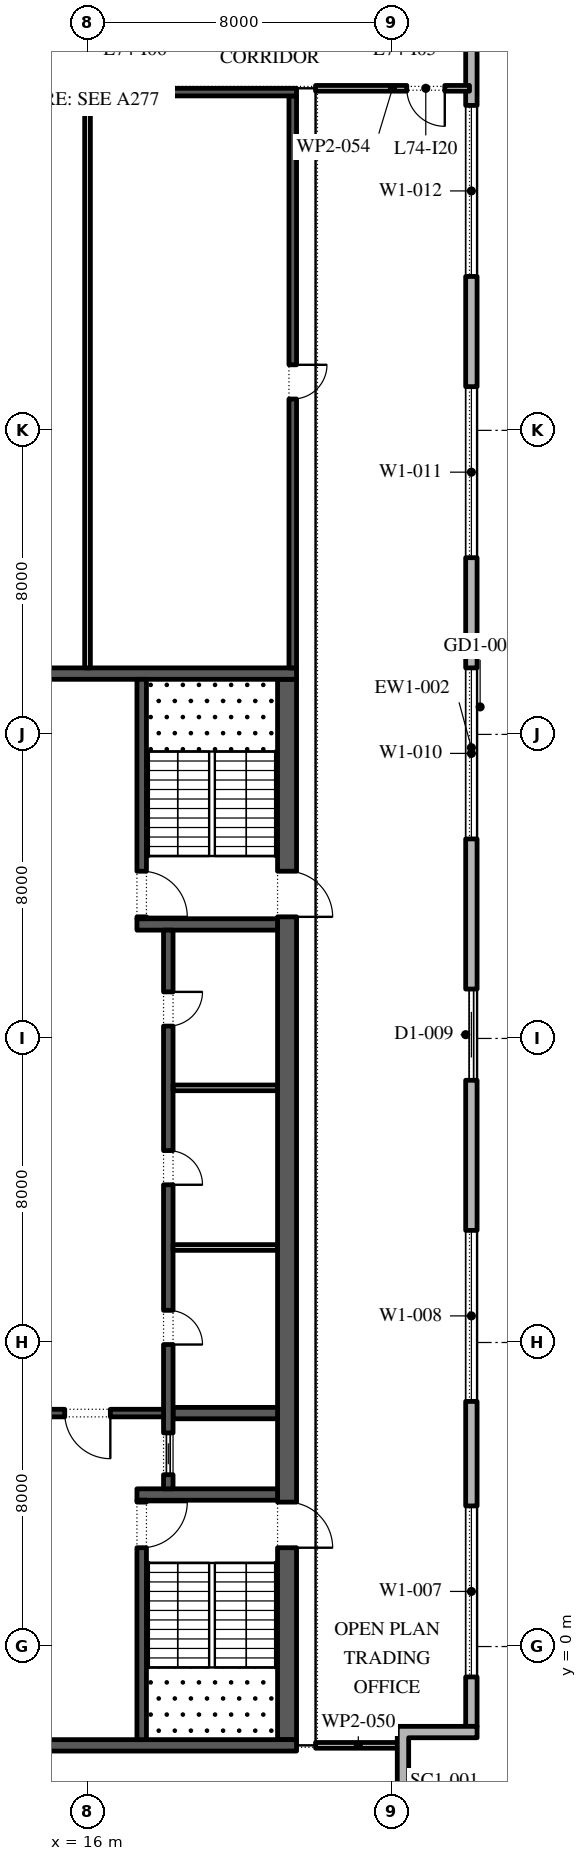
"""IFC4 building model, lengths in metres.
Left out: names, types, materials, properties, quantities, classifications, styles, units other than length and angle.
Written with IfcOpenShell. Run it as: python <this file> out.ifc"""

import sys

from ifc_helpers import new_model, si_unit, direction, frame, frame_2d, origin, place, context, subcontext, project, spatial, polyline, rectangle, outline, extrude, element, fill, save


model = new_model("IFC4")
c1 = context("Model", 3, precision=1e-05, world=origin(), true_north=direction((0.0, 1.0)))
c2 = subcontext(c1, "Body", "Model", "MODEL_VIEW")
j1 = project(units=[si_unit("LENGTHUNIT", "METRE"), si_unit("PLANEANGLEUNIT", "RADIAN")], contexts=[c1])
p1 = place(None, origin())
s1 = spatial("IfcSite", under=j1, at=p1, CompositionType="ELEMENT")
p2 = place(p1, origin())
s2 = spatial("IfcBuilding", under=s1, at=p2, CompositionType="ELEMENT")
p3 = place(p2, frame((0.0, 0.0, 338.4)))
s3 = spatial("IfcBuildingStorey", under=s2, at=p3, CompositionType="ELEMENT", Elevation=338.4)
p4 = place(p3, frame((26.1, -2.1, 0.0), z_axis=(0.0, 0.0, 1.0), x_axis=(0.0, 1.0, 0.0)))
e1 = element("IfcWall", 1, at=p4, inside=s3, PredefinedType="STANDARD", context=c2, shape_type="SweptSolid", body=[
    extrude(rectangle(XDim=51.5, YDim=0.3, at=frame_2d((25.75, 0.0))), origin(), (0.0, 0.0, 1.0), 4.0),
])
p5 = place(p4, frame((1.3, 0.0, 0.45)))
e2 = element("IfcOpeningElement", 2, at=p5, cuts=e1, PredefinedType="OPENING", context=c2, shape_type="SweptSolid", body=[
    extrude(rectangle(XDim=4.5, YDim=3.05, at=frame_2d((2.25, 1.525))), frame((0.0, 0.16, 0.0), z_axis=(0.0, -1.0, 0.0), x_axis=(1.0, 0.0, 0.0)), (0.0, 0.0, 1.0), 0.32),
])
p6 = place(p4, frame((8.55, 0.0, 0.45)))
e3 = element("IfcOpeningElement", 3, at=p6, cuts=e1, PredefinedType="OPENING", context=c2, shape_type="SweptSolid", body=[
    extrude(rectangle(XDim=4.5, YDim=3.05, at=frame_2d((2.25, 1.525))), frame((0.0, 0.16, 0.0), z_axis=(0.0, -1.0, 0.0), x_axis=(1.0, 0.0, 0.0)), (0.0, 0.0, 1.0), 0.32),
])
p7 = place(p4, frame((17.0, 0.0, 0.0)))
e4 = element("IfcOpeningElement", 4, at=p7, cuts=e1, PredefinedType="OPENING", context=c2, shape_type="SweptSolid", body=[
    extrude(rectangle(XDim=2.4, YDim=3.5, at=frame_2d((1.2, 1.75))), frame((0.0, 0.16, 0.0), z_axis=(0.0, -1.0, 0.0), x_axis=(1.0, 0.0, 0.0)), (0.0, 0.0, 1.0), 0.32),
])
p8 = place(p4, frame((23.35, 0.0, 0.45)))
e5 = element("IfcOpeningElement", 5, at=p8, cuts=e1, PredefinedType="OPENING", context=c2, shape_type="SweptSolid", body=[
    extrude(rectangle(XDim=4.5, YDim=3.05, at=frame_2d((2.25, 1.525))), frame((0.0, 0.16, 0.0), z_axis=(0.0, -1.0, 0.0), x_axis=(1.0, 0.0, 0.0)), (0.0, 0.0, 1.0), 0.32),
])
p9 = place(p4, frame((30.75, 0.0, 0.45)))
e6 = element("IfcOpeningElement", 6, at=p9, cuts=e1, PredefinedType="OPENING", context=c2, shape_type="SweptSolid", body=[
    extrude(rectangle(XDim=4.5, YDim=3.05, at=frame_2d((2.25, 1.525))), frame((0.0, 0.16, 0.0), z_axis=(0.0, -1.0, 0.0), x_axis=(1.0, 0.0, 0.0)), (0.0, 0.0, 1.0), 0.32),
])
p10 = place(p4, frame((38.15, 0.0, 0.45)))
e7 = element("IfcOpeningElement", 7, at=p10, cuts=e1, PredefinedType="OPENING", context=c2, shape_type="SweptSolid", body=[
    extrude(rectangle(XDim=4.5, YDim=3.05, at=frame_2d((2.25, 1.525))), frame((0.0, 0.16, 0.0), z_axis=(0.0, -1.0, 0.0), x_axis=(1.0, 0.0, 0.0)), (0.0, 0.0, 1.0), 0.32),
])
p11 = place(p4, frame((46.6, 0.0, 0.0)))
e8 = element("IfcOpeningElement", 8, at=p11, cuts=e1, PredefinedType="OPENING", context=c2, shape_type="SweptSolid", body=[
    extrude(rectangle(XDim=2.4, YDim=3.5, at=frame_2d((1.2, 1.75))), frame((0.0, 0.16, 0.0), z_axis=(0.0, -1.0, 0.0), x_axis=(1.0, 0.0, 0.0)), (0.0, 0.0, 1.0), 0.32),
])
p12 = place(p3, origin())
e9 = element("IfcWall", 9, at=p12, inside=s3, PredefinedType="STANDARD", context=c2, shape_type="SweptSolid", body=[
    extrude(outline(polyline([(24.15, -3.9), (24.15, -2.1), (26.25, -2.1), (26.25, -2.4), (24.45, -2.4), (24.45, -4.2), (22.65, -4.2), (22.65, -5.7), (22.35, -5.7), (22.35, -3.9), (24.15, -3.9)])), origin(), (0.0, 0.0, 1.0), 4.0),
])
p13 = place(p3, frame((21.25, -2.45, 0.0), z_axis=(0.0, 0.0, 1.0), x_axis=(0.0, 1.0, 0.0)))
e10 = element("IfcWall", 10, at=p13, inside=s3, PredefinedType="SHEAR", context=c2, shape_type="SweptSolid", body=[
    extrude(rectangle(XDim=27.9, YDim=0.5, at=frame_2d((13.95, 0.0))), origin(), (0.0, 0.0, 1.0), 4.0),
])
p14 = place(p13, frame((5.05, 0.0, 0.0)))
e11 = element("IfcOpeningElement", 11, at=p14, cuts=e10, PredefinedType="OPENING", context=c2, shape_type="SweptSolid", body=[
    extrude(rectangle(XDim=1.2, YDim=2.1, at=frame_2d((0.6, 1.05))), frame((0.0, 0.26, 0.0), z_axis=(0.0, -1.0, 0.0), x_axis=(1.0, 0.0, 0.0)), (0.0, 0.0, 1.0), 0.52),
])
p15 = place(p13, frame((21.65, 0.0, 0.0)))
e12 = element("IfcOpeningElement", 12, at=p15, cuts=e10, PredefinedType="OPENING", context=c2, shape_type="SweptSolid", body=[
    extrude(rectangle(XDim=1.2, YDim=2.1, at=frame_2d((0.6, 1.05))), frame((0.0, 0.26, 0.0), z_axis=(0.0, -1.0, 0.0), x_axis=(1.0, 0.0, 0.0)), (0.0, 0.0, 1.0), 0.52),
])
for number, where, z_axis, x_axis in (
    (13, (10.5, -2.6, 0.0), (0.0, 0.0, 1.0), (1.0, 0.0, 0.0)),
    (14, (10.5, 25.6, 0.0), (0.0, 0.0, 1.0), (1.0, 0.0, 0.0)),
):
    element("IfcWall", number, at=place(p3, frame(where, z_axis=z_axis, x_axis=x_axis)), inside=s3, PredefinedType="SHEAR", context=c2, shape_type="SweptSolid", body=[
        extrude(rectangle(XDim=11.0, YDim=0.3, at=frame_2d((5.5, 0.0))), origin(), (0.0, 0.0, 1.0), 4.0),
    ])
p16 = place(p3, frame((17.3, 4.0, 0.0), z_axis=(0.0, 0.0, 1.0), x_axis=(1.0, 0.0, 0.0)))
e15 = element("IfcWall", 15, at=p16, inside=s3, PredefinedType="SHEAR", context=c2, shape_type="SweptSolid", body=[
    extrude(rectangle(XDim=3.7, YDim=0.3, at=frame_2d((1.85, 0.0))), origin(), (0.0, 0.0, 1.0), 4.0),
])
p17 = place(p3, frame((17.425, -2.45, 0.0), z_axis=(0.0, 0.0, 1.0), x_axis=(0.0, 1.0, 0.0)))
e16 = element("IfcWall", 16, at=p17, inside=s3, PredefinedType="SHEAR", context=c2, shape_type="SweptSolid", body=[
    extrude(rectangle(XDim=6.3, YDim=0.25, at=frame_2d((3.15, 0.0))), origin(), (0.0, 0.0, 1.0), 4.0),
])
p18 = place(p17, frame((5.05, 0.0, 0.0)))
e17 = element("IfcOpeningElement", 17, at=p18, cuts=e16, PredefinedType="OPENING", context=c2, shape_type="SweptSolid", body=[
    extrude(rectangle(XDim=1.2, YDim=2.1, at=frame_2d((0.6, 1.05))), frame((0.0, 0.135, 0.0), z_axis=(0.0, -1.0, 0.0), x_axis=(1.0, 0.0, 0.0)), (0.0, 0.0, 1.0), 0.27),
])
p19 = place(p3, frame((17.3, 19.0, 0.0), z_axis=(0.0, 0.0, 1.0), x_axis=(1.0, 0.0, 0.0)))
e18 = element("IfcWall", 18, at=p19, inside=s3, PredefinedType="SHEAR", context=c2, shape_type="SweptSolid", body=[
    extrude(rectangle(XDim=3.7, YDim=0.3, at=frame_2d((1.85, 0.0))), origin(), (0.0, 0.0, 1.0), 4.0),
])
p20 = place(p3, frame((17.425, 19.15, 0.0), z_axis=(0.0, 0.0, 1.0), x_axis=(0.0, 1.0, 0.0)))
e19 = element("IfcWall", 19, at=p20, inside=s3, PredefinedType="SHEAR", context=c2, shape_type="SweptSolid", body=[
    extrude(rectangle(XDim=6.3, YDim=0.25, at=frame_2d((3.15, 0.0))), origin(), (0.0, 0.0, 1.0), 4.0),
])
p21 = place(p20, frame((0.05, 0.0, 0.0)))
e20 = element("IfcOpeningElement", 20, at=p21, cuts=e19, PredefinedType="OPENING", context=c2, shape_type="SweptSolid", body=[
    extrude(rectangle(XDim=1.2, YDim=2.1, at=frame_2d((0.6, 1.05))), frame((0.0, 0.135, 0.0), z_axis=(0.0, -1.0, 0.0), x_axis=(1.0, 0.0, 0.0)), (0.0, 0.0, 1.0), 0.27),
])
p22 = place(p3, frame((18.25, 6.143, 0.0), z_axis=(0.0, 0.0, 1.0), x_axis=(1.0, 0.0, 0.0)))
e21 = element("IfcWall", 21, at=p22, inside=s3, PredefinedType="SHEAR", context=c2, shape_type="SweptSolid", body=[
    extrude(rectangle(XDim=2.75, YDim=0.3, at=frame_2d((1.375, 0.0))), origin(), (0.0, 0.0, 1.0), 4.0),
])
p23 = place(p3, frame((18.125, 4.15, 0.0), z_axis=(0.0, 0.0, 1.0), x_axis=(0.0, 1.0, 0.0)))
e22 = element("IfcWall", 22, at=p23, inside=s3, PredefinedType="SHEAR", context=c2, shape_type="SweptSolid", body=[
    extrude(rectangle(XDim=14.7, YDim=0.25, at=frame_2d((7.35, 0.0))), origin(), (0.0, 0.0, 1.0), 4.0),
])
p24 = place(p23, frame((3.796, 0.0, 0.0)))
e23 = element("IfcOpeningElement", 23, at=p24, cuts=e22, PredefinedType="OPENING", context=c2, shape_type="SweptSolid", body=[
    extrude(rectangle(XDim=0.9, YDim=2.1, at=frame_2d((0.45, 1.05))), frame((0.0, 0.135, 0.0), z_axis=(0.0, -1.0, 0.0), x_axis=(1.0, 0.0, 0.0)), (0.0, 0.0, 1.0), 0.27),
])
p25 = place(p23, frame((8.0, 0.0, 0.0)))
e24 = element("IfcOpeningElement", 24, at=p25, cuts=e22, PredefinedType="OPENING", context=c2, shape_type="SweptSolid", body=[
    extrude(rectangle(XDim=0.9, YDim=2.1, at=frame_2d((0.45, 1.05))), frame((0.0, 0.135, 0.0), z_axis=(0.0, -1.0, 0.0), x_axis=(1.0, 0.0, 0.0)), (0.0, 0.0, 1.0), 0.27),
])
p26 = place(p23, frame((12.175, 0.0, 0.0)))
e25 = element("IfcOpeningElement", 25, at=p26, cuts=e22, PredefinedType="OPENING", context=c2, shape_type="SweptSolid", body=[
    extrude(rectangle(XDim=0.9, YDim=2.1, at=frame_2d((0.45, 1.05))), frame((0.0, 0.135, 0.0), z_axis=(0.0, -1.0, 0.0), x_axis=(1.0, 0.0, 0.0)), (0.0, 0.0, 1.0), 0.27),
])
p27 = place(p23, frame((0.371, 0.0, 0.0)))
e26 = element("IfcOpeningElement", 26, at=p27, cuts=e22, PredefinedType="OPENING", context=c2, shape_type="SweptSolid", body=[
    extrude(rectangle(XDim=1.1, YDim=2.1, at=frame_2d((0.55, 1.05))), frame((0.0, 0.135, 0.0), z_axis=(0.0, -1.0, 0.0), x_axis=(1.0, 0.0, 0.0)), (0.0, 0.0, 1.0), 0.27),
])
for number, where, z_axis, x_axis in (
    (27, (18.25, 10.5, 0.0), (0.0, 0.0, 1.0), (1.0, 0.0, 0.0)),
    (28, (18.25, 14.7, 0.0), (0.0, 0.0, 1.0), (1.0, 0.0, 0.0)),
):
    element("IfcWall", number, at=place(p3, frame(where, z_axis=z_axis, x_axis=x_axis)), inside=s3, PredefinedType="PARTITIONING", context=c2, shape_type="SweptSolid", body=[
        extrude(rectangle(XDim=2.75, YDim=0.15, at=frame_2d((1.375, 0.0))), origin(), (0.0, 0.0, 1.0), 4.0),
    ])
p28 = place(p3, frame((14.0, 6.143, 0.0), z_axis=(0.0, 0.0, 1.0), x_axis=(1.0, 0.0, 0.0)))
e29 = element("IfcWall", 29, at=p28, inside=s3, PredefinedType="SHEAR", context=c2, shape_type="SweptSolid", body=[
    extrude(rectangle(XDim=4.0, YDim=0.2, at=frame_2d((2.0, 0.0))), origin(), (0.0, 0.0, 1.0), 4.0),
])
p29 = place(p28, frame((1.4, 0.0, 0.0)))
e30 = element("IfcOpeningElement", 30, at=p29, cuts=e29, PredefinedType="OPENING", context=c2, shape_type="SweptSolid", body=[
    extrude(rectangle(XDim=1.2, YDim=2.1, at=frame_2d((0.6, 1.05))), frame((0.0, 0.11, 0.0), z_axis=(0.0, -1.0, 0.0), x_axis=(1.0, 0.0, 0.0)), (0.0, 0.0, 1.0), 0.22),
])
p30 = place(p3, frame((21.4, 25.75, 0.0), z_axis=(0.0, 0.0, 1.0), x_axis=(0.0, 1.0, 0.0)))
e31 = element("IfcWall", 31, at=p30, inside=s3, PredefinedType="SHEAR", context=c2, shape_type="SweptSolid", body=[
    extrude(rectangle(XDim=15.05, YDim=0.2, at=frame_2d((7.525, 0.0))), origin(), (0.0, 0.0, 1.0), 4.0),
])
p31 = place(p30, frame((7.075, 0.0, 0.0)))
e32 = element("IfcOpeningElement", 32, at=p31, cuts=e31, PredefinedType="OPENING", context=c2, shape_type="SweptSolid", body=[
    extrude(rectangle(XDim=0.9, YDim=2.1, at=frame_2d((0.45, 1.05))), frame((0.0, 0.11, 0.0), z_axis=(0.0, -1.0, 0.0), x_axis=(1.0, 0.0, 0.0)), (0.0, 0.0, 1.0), 0.22),
])
p32 = place(p3, frame((10.5, 40.9, 0.0), z_axis=(0.0, 0.0, 1.0), x_axis=(1.0, 0.0, 0.0)))
e33 = element("IfcWall", 33, at=p32, inside=s3, PredefinedType="SHEAR", context=c2, shape_type="SweptSolid", body=[
    extrude(rectangle(XDim=11.0, YDim=0.2, at=frame_2d((5.5, 0.0))), origin(), (0.0, 0.0, 1.0), 4.0),
])
p33 = place(p3, frame((16.0, 25.75, 0.0), z_axis=(0.0, 0.0, 1.0), x_axis=(0.0, 1.0, 0.0)))
e34 = element("IfcWall", 34, at=p33, inside=s3, PredefinedType="PARTITIONING", context=c2, shape_type="SweptSolid", body=[
    extrude(rectangle(XDim=15.05, YDim=0.15, at=frame_2d((7.525, 0.0))), origin(), (0.0, 0.0, 1.0), 4.0),
])
p34 = place(p3, frame((22.0, -2.6, 0.0), z_axis=(0.0, 0.0, 1.0), x_axis=(1.0, 0.0, 0.0)))
e35 = element("IfcWall", 35, at=p34, inside=s3, PredefinedType="PARTITIONING", context=c2, shape_type="SweptSolid", body=[
    extrude(rectangle(XDim=2.25, YDim=0.15, at=frame_2d((1.125, 0.0))), origin(), (0.0, 0.0, 1.0), 4.0),
])
p35 = place(p3, frame((26.05, 41.0, 0.0), z_axis=(0.0, 0.0, 1.0), x_axis=(-1.0, 0.0, 0.0)))
e36 = element("IfcWall", 36, at=p35, inside=s3, PredefinedType="PARTITIONING", context=c2, shape_type="SweptSolid", body=[
    extrude(rectangle(XDim=4.05, YDim=0.15, at=frame_2d((2.025, 0.0))), origin(), (0.0, 0.0, 1.0), 4.0),
])
p36 = place(p35, frame((0.65, 0.0, 0.0)))
e37 = element("IfcOpeningElement", 37, at=p36, cuts=e36, PredefinedType="OPENING", context=c2, shape_type="SweptSolid", body=[
    extrude(rectangle(XDim=1.0, YDim=2.1, at=frame_2d((0.5, 1.05))), frame((0.0, 0.085, 0.0), z_axis=(0.0, -1.0, 0.0), x_axis=(1.0, 0.0, 0.0)), (0.0, 0.0, 1.0), 0.17),
])
p37 = place(p5, origin())
e38 = element("IfcWindow", 38, at=p37, inside=s3, PartitioningType="DOUBLE_PANEL_VERTICAL", PredefinedType="WINDOW", context=c2, shape_type="SweptSolid", body=[
    extrude(rectangle(XDim=4.5, YDim=3.05, at=frame_2d((2.25, 1.525))), frame((0.0, 0.03, 0.0), z_axis=(0.0, -1.0, 0.0), x_axis=(1.0, 0.0, 0.0)), (0.0, 0.0, 1.0), 0.06),
])
fill(e2, e38)
p38 = place(p6, origin())
e39 = element("IfcWindow", 39, at=p38, inside=s3, PartitioningType="DOUBLE_PANEL_VERTICAL", PredefinedType="WINDOW", context=c2, shape_type="SweptSolid", body=[
    extrude(rectangle(XDim=4.5, YDim=3.05, at=frame_2d((2.25, 1.525))), frame((0.0, 0.03, 0.0), z_axis=(0.0, -1.0, 0.0), x_axis=(1.0, 0.0, 0.0)), (0.0, 0.0, 1.0), 0.06),
])
fill(e3, e39)
p39 = place(p7, origin())
e40 = element("IfcDoor", 40, at=p39, inside=s3, OperationType="DOUBLE_DOOR_SLIDING", PredefinedType="DOOR", context=c2, shape_type="SweptSolid", body=[
    extrude(rectangle(XDim=2.4, YDim=3.5, at=frame_2d((1.2, 1.75))), frame((0.0, 0.025, 0.0), z_axis=(0.0, -1.0, 0.0), x_axis=(1.0, 0.0, 0.0)), (0.0, 0.0, 1.0), 0.05),
])
fill(e4, e40)
p40 = place(p8, origin())
e41 = element("IfcWindow", 41, at=p40, inside=s3, PartitioningType="DOUBLE_PANEL_VERTICAL", PredefinedType="WINDOW", context=c2, shape_type="SweptSolid", body=[
    extrude(rectangle(XDim=4.5, YDim=3.05, at=frame_2d((2.25, 1.525))), frame((0.0, 0.03, 0.0), z_axis=(0.0, -1.0, 0.0), x_axis=(1.0, 0.0, 0.0)), (0.0, 0.0, 1.0), 0.06),
])
fill(e5, e41)
p41 = place(p9, origin())
e42 = element("IfcWindow", 42, at=p41, inside=s3, PartitioningType="DOUBLE_PANEL_VERTICAL", PredefinedType="WINDOW", context=c2, shape_type="SweptSolid", body=[
    extrude(rectangle(XDim=4.5, YDim=3.05, at=frame_2d((2.25, 1.525))), frame((0.0, 0.03, 0.0), z_axis=(0.0, -1.0, 0.0), x_axis=(1.0, 0.0, 0.0)), (0.0, 0.0, 1.0), 0.06),
])
fill(e6, e42)
p42 = place(p10, origin())
e43 = element("IfcWindow", 43, at=p42, inside=s3, PartitioningType="DOUBLE_PANEL_VERTICAL", PredefinedType="WINDOW", context=c2, shape_type="SweptSolid", body=[
    extrude(rectangle(XDim=4.5, YDim=3.05, at=frame_2d((2.25, 1.525))), frame((0.0, 0.03, 0.0), z_axis=(0.0, -1.0, 0.0), x_axis=(1.0, 0.0, 0.0)), (0.0, 0.0, 1.0), 0.06),
])
fill(e7, e43)
p43 = place(p24, frame((0.9, -0.2, 0.0), z_axis=(0.0, 0.0, 1.0), x_axis=(-1.0, 0.0, 0.0)))
e44 = element("IfcDoor", 44, at=p43, inside=s3, OperationType="SINGLE_SWING_LEFT", PredefinedType="DOOR", context=c2, shape_type="SweptSolid", body=[
    extrude(rectangle(XDim=0.9, YDim=2.1, at=frame_2d((0.45, 1.05))), frame((0.0, -0.075, 0.0), z_axis=(0.0, -1.0, 0.0), x_axis=(1.0, 0.0, 0.0)), (0.0, 0.0, 1.0), 0.05),
])
fill(e23, e44)
p44 = place(p25, frame((0.9, -0.2, 0.0), z_axis=(0.0, 0.0, 1.0), x_axis=(-1.0, 0.0, 0.0)))
e45 = element("IfcDoor", 45, at=p44, inside=s3, OperationType="SINGLE_SWING_LEFT", PredefinedType="DOOR", context=c2, shape_type="SweptSolid", body=[
    extrude(rectangle(XDim=0.9, YDim=2.1, at=frame_2d((0.45, 1.05))), frame((0.0, -0.075, 0.0), z_axis=(0.0, -1.0, 0.0), x_axis=(1.0, 0.0, 0.0)), (0.0, 0.0, 1.0), 0.05),
])
fill(e24, e45)
p45 = place(p26, frame((0.9, -0.2, 0.0), z_axis=(0.0, 0.0, 1.0), x_axis=(-1.0, 0.0, 0.0)))
e46 = element("IfcDoor", 46, at=p45, inside=s3, OperationType="SINGLE_SWING_RIGHT", PredefinedType="DOOR", context=c2, shape_type="SweptSolid", body=[
    extrude(rectangle(XDim=0.9, YDim=2.1, at=frame_2d((0.45, 1.05))), frame((0.0, -0.075, 0.0), z_axis=(0.0, -1.0, 0.0), x_axis=(1.0, 0.0, 0.0)), (0.0, 0.0, 1.0), 0.05),
])
fill(e25, e46)
p46 = place(p27, origin())
e47 = element("IfcDoor", 47, at=p46, inside=s3, OperationType="SLIDING_TO_LEFT", PredefinedType="DOOR", context=c2, shape_type="SweptSolid", body=[
    extrude(rectangle(XDim=1.1, YDim=2.1, at=frame_2d((0.55, 1.05))), frame((0.0, 0.025, 0.0), z_axis=(0.0, -1.0, 0.0), x_axis=(1.0, 0.0, 0.0)), (0.0, 0.0, 1.0), 0.05),
])
fill(e26, e47)
p47 = place(p29, frame((1.2, 0.0, 0.0), z_axis=(0.0, 0.0, 1.0), x_axis=(-1.0, 0.0, 0.0)))
e48 = element("IfcDoor", 48, at=p47, inside=s3, OperationType="SINGLE_SWING_RIGHT", PredefinedType="DOOR", context=c2, shape_type="SweptSolid", body=[
    extrude(rectangle(XDim=1.2, YDim=2.1, at=frame_2d((0.6, 1.05))), frame((0.0, 0.025, 0.0), z_axis=(0.0, -1.0, 0.0), x_axis=(1.0, 0.0, 0.0)), (0.0, 0.0, 1.0), 0.05),
])
fill(e30, e48)
p48 = place(p18, frame((1.2, 0.0, 0.0), z_axis=(0.0, 0.0, 1.0), x_axis=(-1.0, 0.0, 0.0)))
e49 = element("IfcDoor", 49, at=p48, inside=s3, OperationType="SINGLE_SWING_RIGHT", PredefinedType="DOOR", context=c2, shape_type="SweptSolid", body=[
    extrude(rectangle(XDim=1.2, YDim=2.1, at=frame_2d((0.6, 1.05))), frame((0.0, 0.025, 0.0), z_axis=(0.0, -1.0, 0.0), x_axis=(1.0, 0.0, 0.0)), (0.0, 0.0, 1.0), 0.05),
])
fill(e17, e49)
p49 = place(p14, frame((1.2, 0.0, 0.0), z_axis=(0.0, 0.0, 1.0), x_axis=(-1.0, 0.0, 0.0)))
e50 = element("IfcDoor", 50, at=p49, inside=s3, OperationType="SINGLE_SWING_LEFT", PredefinedType="DOOR", context=c2, shape_type="SweptSolid", body=[
    extrude(rectangle(XDim=1.2, YDim=2.1, at=frame_2d((0.6, 1.05))), frame((0.0, 0.025, 0.0), z_axis=(0.0, -1.0, 0.0), x_axis=(1.0, 0.0, 0.0)), (0.0, 0.0, 1.0), 0.05),
])
fill(e11, e50)
p50 = place(p21, frame((1.2, 0.0, 0.0), z_axis=(0.0, 0.0, 1.0), x_axis=(-1.0, 0.0, 0.0)))
e51 = element("IfcDoor", 51, at=p50, inside=s3, OperationType="SINGLE_SWING_LEFT", PredefinedType="DOOR", context=c2, shape_type="SweptSolid", body=[
    extrude(rectangle(XDim=1.2, YDim=2.1, at=frame_2d((0.6, 1.05))), frame((0.0, 0.025, 0.0), z_axis=(0.0, -1.0, 0.0), x_axis=(1.0, 0.0, 0.0)), (0.0, 0.0, 1.0), 0.05),
])
fill(e20, e51)
p51 = place(p15, frame((1.2, 0.0, 0.0), z_axis=(0.0, 0.0, 1.0), x_axis=(-1.0, 0.0, 0.0)))
e52 = element("IfcDoor", 52, at=p51, inside=s3, OperationType="SINGLE_SWING_LEFT", PredefinedType="DOOR", context=c2, shape_type="SweptSolid", body=[
    extrude(rectangle(XDim=1.2, YDim=2.1, at=frame_2d((0.6, 1.05))), frame((0.0, 0.025, 0.0), z_axis=(0.0, -1.0, 0.0), x_axis=(1.0, 0.0, 0.0)), (0.0, 0.0, 1.0), 0.05),
])
fill(e12, e52)
p52 = place(p31, frame((0.9, 0.15, 0.0), z_axis=(0.0, 0.0, 1.0), x_axis=(-1.0, 0.0, 0.0)))
e53 = element("IfcDoor", 53, at=p52, inside=s3, OperationType="SINGLE_SWING_RIGHT", PredefinedType="DOOR", context=c2, shape_type="SweptSolid", body=[
    extrude(rectangle(XDim=0.9, YDim=2.1, at=frame_2d((0.45, 1.05))), frame((0.0, 0.1, 0.0), z_axis=(0.0, -1.0, 0.0), x_axis=(1.0, 0.0, 0.0)), (0.0, 0.0, 1.0), 0.05),
])
fill(e32, e53)
p53 = place(p36, origin())
e54 = element("IfcDoor", 54, at=p53, inside=s3, OperationType="SINGLE_SWING_RIGHT", PredefinedType="DOOR", context=c2, shape_type="SweptSolid", body=[
    extrude(rectangle(XDim=1.0, YDim=2.1, at=frame_2d((0.5, 1.05))), frame((0.0, 0.025, 0.0), z_axis=(0.0, -1.0, 0.0), x_axis=(1.0, 0.0, 0.0)), (0.0, 0.0, 1.0), 0.05),
])
fill(e37, e54)
save(model, sys.argv[1])
